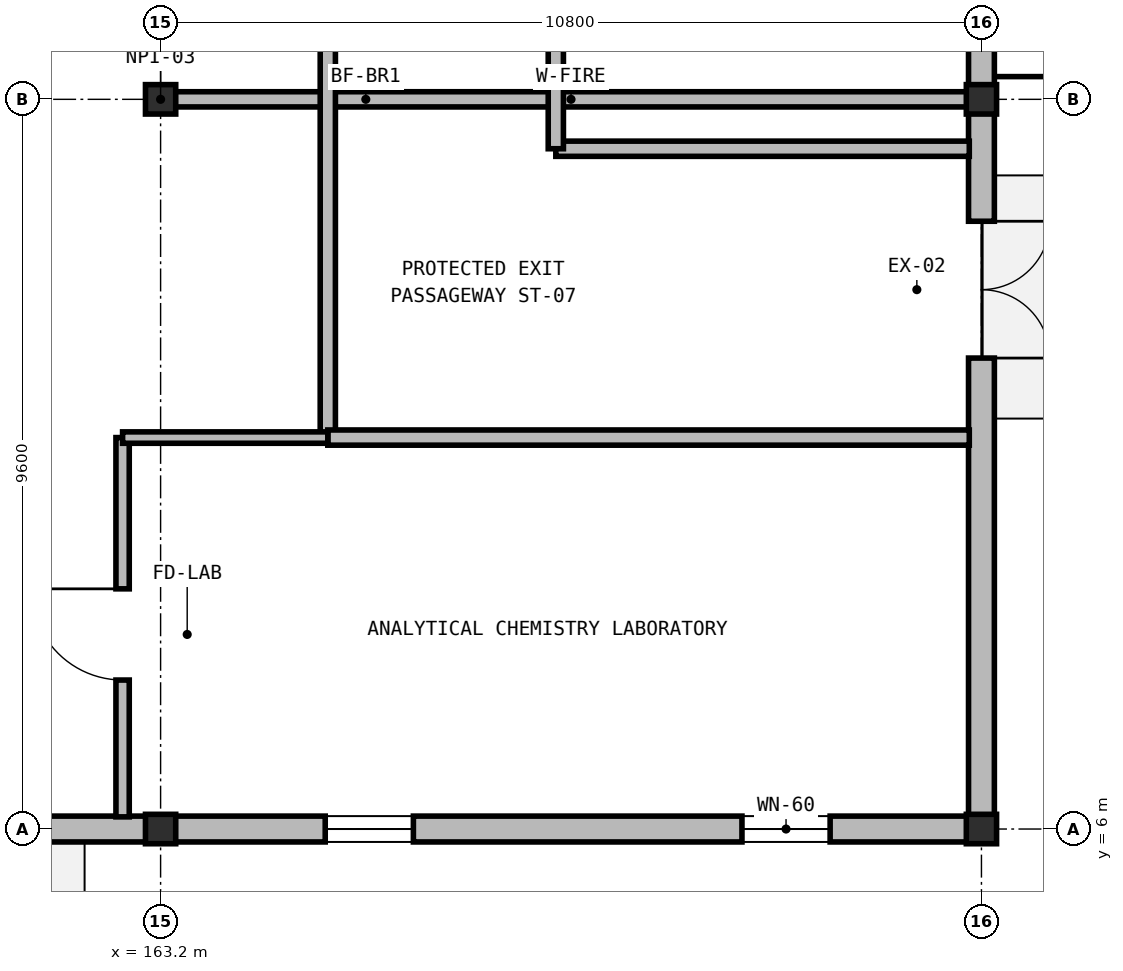
"""IFC4 building model, lengths in metres.
Left out: names, types, materials, properties, quantities, classifications, styles, units other than length and angle.
Written with IfcOpenShell. Run it as: python <this file> out.ifc"""

import sys

from ifc_helpers import new_model, si_unit, direction, frame, frame_2d, origin, origin_2d, place, context, subcontext, project, spatial, rectangle, i_section, extrude, element, fill, save


model = new_model("IFC4")
c1 = context("Model", 3, precision=1e-05, world=origin(), true_north=direction((0.0, 1.0)))
c2 = subcontext(c1, "Body", "Model", "MODEL_VIEW")
j1 = project(units=[si_unit("LENGTHUNIT", "METRE"), si_unit("PLANEANGLEUNIT", "RADIAN")], contexts=[c1])
p1 = place(None, origin())
s1 = spatial("IfcSite", under=j1, at=p1, CompositionType="ELEMENT")
p2 = place(p1, origin())
s2 = spatial("IfcBuilding", under=s1, at=p2, CompositionType="ELEMENT")
p3 = place(p2, origin())
s3 = spatial("IfcBuildingStorey", under=s2, at=p3, CompositionType="ELEMENT", Elevation=0.0)
for number, where, z_axis, x_axis in (
    (1, (163.2, 6.0, 0.0), (0.0, 0.0, 1.0), (1.0, 0.0, 0.0)),
    (2, (163.2, 15.6, 0.0), (0.0, 0.0, 1.0), (1.0, 0.0, 0.0)),
    (3, (174.0, 6.0, 0.0), (0.0, 0.0, 1.0), (1.0, 0.0, 0.0)),
    (4, (174.0, 15.6, 0.0), (0.0, 0.0, 1.0), (1.0, 0.0, 0.0)),
):
    element("IfcColumn", number, at=place(p3, frame(where, z_axis=z_axis, x_axis=x_axis)), inside=s3, PredefinedType="COLUMN", context=c2, shape_type="SweptSolid", body=[
        extrude(i_section(OverallWidth=0.398, OverallDepth=0.387, WebThickness=0.024, FlangeThickness=0.039, at=origin_2d()), origin(), (0.0, 0.0, 1.0), 5.25),
    ])
p4 = place(p3, frame((174.0, 25.196, 0.0), z_axis=(0.0, 0.0, 1.0), x_axis=(0.0, -1.0, 0.0)))
e5 = element("IfcWall", 5, at=p4, inside=s3, PredefinedType="SOLIDWALL", context=c2, shape_type="SweptSolid", body=[
    extrude(rectangle(XDim=9.592, YDim=0.34, at=frame_2d((4.796, 0.0))), origin(), (0.0, 0.0, 1.0), 4.584),
])
p5 = place(p4, frame((3.501, 0.0, 0.95)))
e6 = element("IfcOpeningElement", 6, at=p5, cuts=e5, PredefinedType="OPENING", context=c2, shape_type="SweptSolid", body=[
    extrude(rectangle(XDim=2.59, YDim=2.05, at=frame_2d((1.295, 1.025))), frame((0.0, 0.18, 0.0), z_axis=(0.0, -1.0, 0.0), x_axis=(1.0, 0.0, 0.0)), (0.0, 0.0, 1.0), 0.36),
])
p6 = place(p3, frame((174.0, 15.596, 0.0), z_axis=(0.0, 0.0, 1.0), x_axis=(0.0, -1.0, 0.0)))
e7 = element("IfcWall", 7, at=p6, inside=s3, PredefinedType="SOLIDWALL", context=c2, shape_type="SweptSolid", body=[
    extrude(rectangle(XDim=9.422, YDim=0.34, at=frame_2d((4.711, 0.0))), origin(), (0.0, 0.0, 1.0), 4.584),
])
p7 = place(p6, frame((1.6, 0.0, 0.0)))
e8 = element("IfcOpeningElement", 8, at=p7, cuts=e7, PredefinedType="OPENING", context=c2, shape_type="SweptSolid", body=[
    extrude(rectangle(XDim=1.8, YDim=2.25, at=frame_2d((0.9, 1.125))), frame((0.0, 0.18, 0.0), z_axis=(0.0, -1.0, 0.0), x_axis=(1.0, 0.0, 0.0)), (0.0, 0.0, 1.0), 0.36),
])
p8 = place(p3, frame((174.17, 6.0, 0.0), z_axis=(0.0, 0.0, 1.0), x_axis=(-1.0, 0.0, 0.0)))
e9 = element("IfcWall", 9, at=p8, inside=s3, PredefinedType="SOLIDWALL", context=c2, shape_type="SweptSolid", body=[
    extrude(rectangle(XDim=10.966, YDim=0.34, at=frame_2d((5.483, 0.0))), origin(), (0.0, 0.0, 1.0), 4.516),
])
p9 = place(p8, frame((2.161, 0.0, 0.95)))
e10 = element("IfcOpeningElement", 10, at=p9, cuts=e9, PredefinedType="OPENING", context=c2, shape_type="SweptSolid", body=[
    extrude(rectangle(XDim=1.16, YDim=1.97, at=frame_2d((0.58, 0.985))), frame((0.0, 0.18, 0.0), z_axis=(0.0, -1.0, 0.0), x_axis=(1.0, 0.0, 0.0)), (0.0, 0.0, 1.0), 0.36),
])
p10 = place(p8, frame((7.644, 0.0, 0.95)))
e11 = element("IfcOpeningElement", 11, at=p10, cuts=e9, PredefinedType="OPENING", context=c2, shape_type="SweptSolid", body=[
    extrude(rectangle(XDim=1.16, YDim=1.97, at=frame_2d((0.58, 0.985))), frame((0.0, 0.18, 0.0), z_axis=(0.0, -1.0, 0.0), x_axis=(1.0, 0.0, 0.0)), (0.0, 0.0, 1.0), 0.36),
])
p11 = place(p3, frame((163.196, 6.0, 0.0), z_axis=(0.0, 0.0, 1.0), x_axis=(-1.0, 0.0, 0.0)))
e12 = element("IfcWall", 12, at=p11, inside=s3, PredefinedType="SOLIDWALL", context=c2, shape_type="SweptSolid", body=[
    extrude(rectangle(XDim=9.766, YDim=0.34, at=frame_2d((4.883, 0.0))), origin(), (0.0, 0.0, 1.0), 4.584),
])
p12 = place(p11, frame((1.6, 0.0, 0.0)))
e13 = element("IfcOpeningElement", 13, at=p12, cuts=e12, PredefinedType="OPENING", context=c2, shape_type="SweptSolid", body=[
    extrude(rectangle(XDim=2.0, YDim=2.3, at=frame_2d((1.0, 1.15))), frame((0.0, 0.18, 0.0), z_axis=(0.0, -1.0, 0.0), x_axis=(1.0, 0.0, 0.0)), (0.0, 0.0, 1.0), 0.36),
])
p13 = place(p3, frame((163.36, 15.6, 0.0), z_axis=(0.0, 0.0, 1.0), x_axis=(1.0, 0.0, 0.0)))
e14 = element("IfcWall", 14, at=p13, inside=s3, PredefinedType="SOLIDWALL", context=c2, shape_type="SweptSolid", body=[
    extrude(rectangle(XDim=10.48, YDim=0.2, at=frame_2d((5.24, 0.0))), origin(), (0.0, 0.0, 1.0), 4.438),
])
p14 = place(p3, frame((165.4, 11.15, 0.0), z_axis=(0.0, 0.0, 1.0), x_axis=(0.0, 1.0, 0.0)))
e15 = element("IfcWall", 15, at=p14, inside=s3, PredefinedType="SOLIDWALL", context=c2, shape_type="SweptSolid", body=[
    extrude(rectangle(XDim=10.2, YDim=0.2, at=frame_2d((5.1, 0.0))), origin(), (0.0, 0.0, 1.0), 4.93),
])
p15 = place(p3, frame((165.4, 11.15, 0.0), z_axis=(0.0, 0.0, 1.0), x_axis=(1.0, 0.0, 0.0)))
e16 = element("IfcWall", 16, at=p15, inside=s3, PredefinedType="SOLIDWALL", context=c2, shape_type="SweptSolid", body=[
    extrude(rectangle(XDim=8.44, YDim=0.2, at=frame_2d((4.22, 0.0))), origin(), (0.0, 0.0, 1.0), 4.93),
])
p16 = place(p3, frame((168.4, 14.95, 0.0), z_axis=(0.0, 0.0, 1.0), x_axis=(1.0, 0.0, 0.0)))
e17 = element("IfcWall", 17, at=p16, inside=s3, PredefinedType="SOLIDWALL", context=c2, shape_type="SweptSolid", body=[
    extrude(rectangle(XDim=5.44, YDim=0.2, at=frame_2d((2.72, 0.0))), origin(), (0.0, 0.0, 1.0), 4.93),
])
p17 = place(p3, frame((168.4, 14.95, 0.0), z_axis=(0.0, 0.0, 1.0), x_axis=(0.0, 1.0, 0.0)))
e18 = element("IfcWall", 18, at=p17, inside=s3, PredefinedType="SOLIDWALL", context=c2, shape_type="SweptSolid", body=[
    extrude(rectangle(XDim=6.4, YDim=0.2, at=frame_2d((3.2, 0.0))), origin(), (0.0, 0.0, 1.0), 4.93),
])
p18 = place(p3, frame((162.7, 6.16, 0.0), z_axis=(0.0, 0.0, 1.0), x_axis=(0.0, 1.0, 0.0)))
e19 = element("IfcWall", 19, at=p18, inside=s3, PredefinedType="PARTITIONING", context=c2, shape_type="SweptSolid", body=[
    extrude(rectangle(XDim=4.99, YDim=0.175, at=frame_2d((2.495, 0.0))), origin(), (0.0, 0.0, 1.0), 4.93),
])
p19 = place(p18, frame((1.8, 0.0, 0.0)))
e20 = element("IfcOpeningElement", 20, at=p19, cuts=e19, PredefinedType="OPENING", context=c2, shape_type="SweptSolid", body=[
    extrude(rectangle(XDim=1.2, YDim=2.2, at=frame_2d((0.6, 1.1))), frame((0.0, 0.097, 0.0), z_axis=(0.0, -1.0, 0.0), x_axis=(1.0, 0.0, 0.0)), (0.0, 0.0, 1.0), 0.195),
])
p20 = place(p3, frame((162.7, 11.15, 0.0), z_axis=(0.0, 0.0, 1.0), x_axis=(1.0, 0.0, 0.0)))
e21 = element("IfcWall", 21, at=p20, inside=s3, PredefinedType="PARTITIONING", context=c2, shape_type="SweptSolid", body=[
    extrude(rectangle(XDim=2.7, YDim=0.15, at=frame_2d((1.35, 0.0))), origin(), (0.0, 0.0, 1.0), 4.93),
])
p21 = place(p7, origin())
e22 = element("IfcDoor", 22, at=p21, inside=s3, OperationType="DOUBLE_DOOR_SINGLE_SWING", PredefinedType="DOOR", context=c2, shape_type="SweptSolid", body=[
    extrude(rectangle(XDim=1.8, YDim=2.25, at=frame_2d((0.9, 1.125))), frame((0.0, 0.025, 0.0), z_axis=(0.0, -1.0, 0.0), x_axis=(1.0, 0.0, 0.0)), (0.0, 0.0, 1.0), 0.05),
])
fill(e8, e22)
p22 = place(p9, origin())
e23 = element("IfcWindow", 23, at=p22, inside=s3, PartitioningType="SINGLE_PANEL", PredefinedType="WINDOW", context=c2, shape_type="SweptSolid", body=[
    extrude(rectangle(XDim=1.16, YDim=1.97, at=frame_2d((0.58, 0.985))), frame((0.0, 0.03, 0.0), z_axis=(0.0, -1.0, 0.0), x_axis=(1.0, 0.0, 0.0)), (0.0, 0.0, 1.0), 0.06),
])
fill(e10, e23)
p23 = place(p10, origin())
e24 = element("IfcWindow", 24, at=p23, inside=s3, PartitioningType="SINGLE_PANEL", PredefinedType="WINDOW", context=c2, shape_type="SweptSolid", body=[
    extrude(rectangle(XDim=1.16, YDim=1.97, at=frame_2d((0.58, 0.985))), frame((0.0, 0.03, 0.0), z_axis=(0.0, -1.0, 0.0), x_axis=(1.0, 0.0, 0.0)), (0.0, 0.0, 1.0), 0.06),
])
fill(e11, e24)
p24 = place(p19, origin())
e25 = element("IfcDoor", 25, at=p24, inside=s3, OperationType="SINGLE_SWING_RIGHT", PredefinedType="DOOR", context=c2, shape_type="SweptSolid", body=[
    extrude(rectangle(XDim=1.2, YDim=2.2, at=frame_2d((0.6, 1.1))), frame((0.0, 0.025, 0.0), z_axis=(0.0, -1.0, 0.0), x_axis=(1.0, 0.0, 0.0)), (0.0, 0.0, 1.0), 0.05),
])
fill(e20, e25)
save(model, sys.argv[1])
